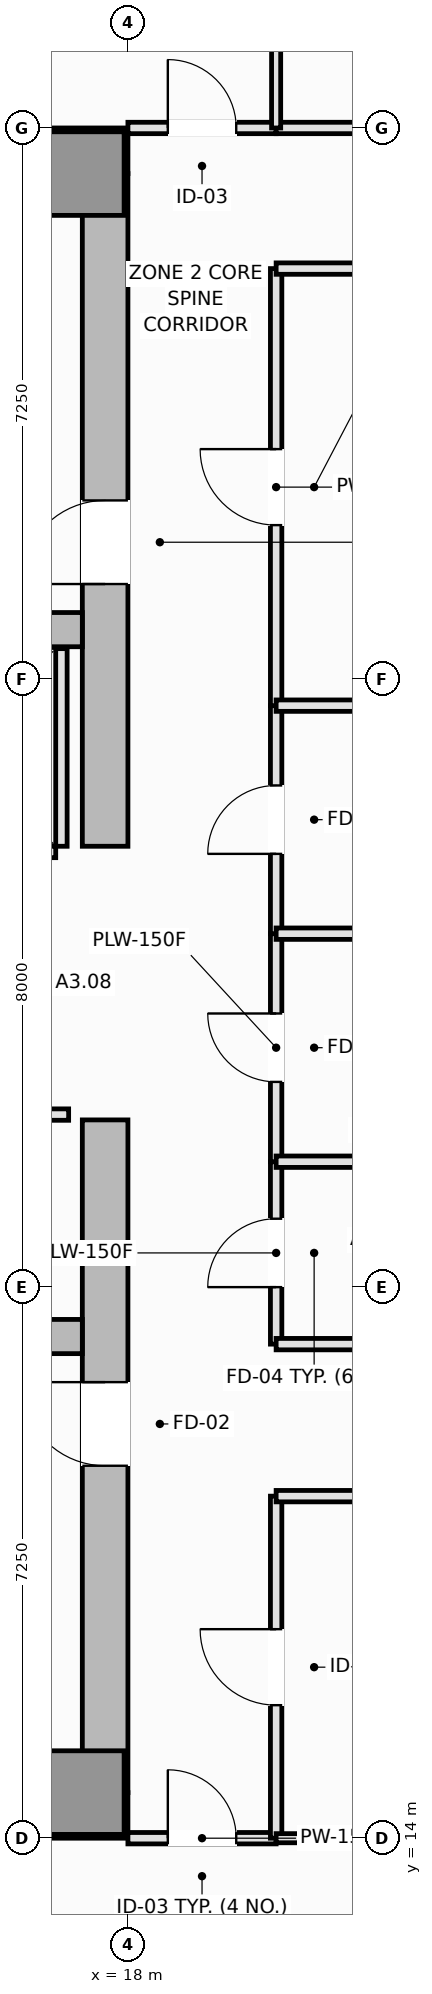
"""IFC4 building model, lengths in metres.
Left out: names, types, materials, properties, quantities, classifications, styles, units other than length and angle.
Written with IfcOpenShell. Run it as: python <this file> out.ifc"""

import sys

from ifc_helpers import new_model, si_unit, direction, frame, frame_2d, origin, origin_2d, place, context, subcontext, project, spatial, rectangle, extrude, element, fill, save


model = new_model("IFC4")
c1 = context("Model", 3, precision=1e-05, world=origin(), true_north=direction((0.0, 1.0)))
c2 = subcontext(c1, "Body", "Model", "MODEL_VIEW")
j1 = project(units=[si_unit("LENGTHUNIT", "METRE"), si_unit("PLANEANGLEUNIT", "RADIAN")], contexts=[c1])
p1 = place(None, origin())
s1 = spatial("IfcSite", under=j1, at=p1, CompositionType="ELEMENT")
p2 = place(p1, origin())
s2 = spatial("IfcBuilding", under=s1, at=p2, CompositionType="ELEMENT")
p3 = place(p2, frame((0.0, 0.0, 137.75)))
s3 = spatial("IfcBuildingStorey", under=s2, at=p3, CompositionType="ELEMENT", Elevation=137.75)
for number, where, z_axis, x_axis in (
    (1, (4.5, 14.3, 0.0), (0.0, 0.0, 1.0), (1.0, 0.0, 0.0)),
    (2, (4.5, 36.2, 0.0), (0.0, 0.0, 1.0), (1.0, 0.0, 0.0)),
):
    element("IfcWall", number, at=place(p3, frame(where, z_axis=z_axis, x_axis=x_axis)), inside=s3, PredefinedType="SHEAR", context=c2, shape_type="SweptSolid", body=[
        extrude(rectangle(XDim=13.5, YDim=0.6, at=frame_2d((6.75, 0.0))), origin(), (0.0, 0.0, 1.0), 3.55),
    ])
p4 = place(p3, frame((17.7, 14.6, 0.0), z_axis=(0.0, 0.0, 1.0), x_axis=(0.0, 1.0, 0.0)))
e3 = element("IfcWall", 3, at=p4, inside=s3, PredefinedType="SHEAR", context=c2, shape_type="SweptSolid", body=[
    extrude(rectangle(XDim=8.85, YDim=0.6, at=frame_2d((4.425, 0.0))), origin(), (0.0, 0.0, 1.0), 3.55),
])
p5 = place(p4, frame((4.3, 0.0, 0.0)))
e4 = element("IfcOpeningElement", 4, at=p5, cuts=e3, PredefinedType="OPENING", context=c2, shape_type="SweptSolid", body=[
    extrude(rectangle(XDim=1.1, YDim=2.15, at=frame_2d((0.55, 1.075))), frame((0.0, 0.31, 0.0), z_axis=(0.0, -1.0, 0.0), x_axis=(1.0, 0.0, 0.0)), (0.0, 0.0, 1.0), 0.62),
])
p6 = place(p3, frame((17.7, 27.05, 0.0), z_axis=(0.0, 0.0, 1.0), x_axis=(0.0, 1.0, 0.0)))
e5 = element("IfcWall", 5, at=p6, inside=s3, PredefinedType="SHEAR", context=c2, shape_type="SweptSolid", body=[
    extrude(rectangle(XDim=8.85, YDim=0.6, at=frame_2d((4.425, 0.0))), origin(), (0.0, 0.0, 1.0), 3.55),
])
p7 = place(p6, frame((3.45, 0.0, 0.0)))
e6 = element("IfcOpeningElement", 6, at=p7, cuts=e5, PredefinedType="OPENING", context=c2, shape_type="SweptSolid", body=[
    extrude(rectangle(XDim=1.1, YDim=2.15, at=frame_2d((0.55, 1.075))), frame((0.0, 0.31, 0.0), z_axis=(0.0, -1.0, 0.0), x_axis=(1.0, 0.0, 0.0)), (0.0, 0.0, 1.0), 0.62),
])
for number, where, z_axis, x_axis in (
    (7, (5.1, 20.6, 0.0), (0.0, 0.0, 1.0), (1.0, 0.0, 0.0)),
    (8, (5.1, 29.9, 0.0), (0.0, 0.0, 1.0), (1.0, 0.0, 0.0)),
):
    element("IfcWall", number, at=place(p3, frame(where, z_axis=z_axis, x_axis=x_axis)), inside=s3, PredefinedType="SHEAR", context=c2, shape_type="SweptSolid", body=[
        extrude(rectangle(XDim=12.3, YDim=0.45, at=frame_2d((6.15, 0.0))), origin(), (0.0, 0.0, 1.0), 3.55),
    ])
for number, where, z_axis, x_axis in (
    (9, (17.4, 14.6, 0.0), (0.0, 0.0, 1.0), (1.0, 0.0, 0.0)),
    (10, (17.4, 35.9, 0.0), (0.0, 0.0, 1.0), (1.0, 0.0, 0.0)),
):
    element("IfcColumn", number, at=place(p3, frame(where, z_axis=z_axis, x_axis=x_axis)), inside=s3, PredefinedType="PILASTER", context=c2, shape_type="SweptSolid", body=[
        extrude(rectangle(XDim=1.1, YDim=1.1, at=origin_2d()), origin(), (0.0, 0.0, 1.0), 3.55),
    ])
p8 = place(p3, frame((14.5, 26.975, 0.0), z_axis=(0.0, 0.0, 1.0), x_axis=(1.0, 0.0, 0.0)))
e11 = element("IfcWall", 11, at=p8, inside=s3, PredefinedType="PARTITIONING", context=c2, shape_type="SweptSolid", body=[
    extrude(rectangle(XDim=2.55, YDim=0.15, at=frame_2d((1.275, 0.0))), origin(), (0.0, 0.0, 1.0), 3.37),
])
p9 = place(p8, frame((0.625, 0.0, 0.0)))
e12 = element("IfcOpeningElement", 12, at=p9, cuts=e11, PredefinedType="OPENING", context=c2, shape_type="SweptSolid", body=[
    extrude(rectangle(XDim=1.3, YDim=2.2, at=frame_2d((0.65, 1.1))), frame((0.0, 0.085, 0.0), z_axis=(0.0, -1.0, 0.0), x_axis=(1.0, 0.0, 0.0)), (0.0, 0.0, 1.0), 0.17),
])
p10 = place(p3, frame((17.125, 27.05, 0.0), z_axis=(0.0, 0.0, 1.0), x_axis=(0.0, 1.0, 0.0)))
e13 = element("IfcWall", 13, at=p10, inside=s3, PredefinedType="PARTITIONING", context=c2, shape_type="SweptSolid", body=[
    extrude(rectangle(XDim=2.6, YDim=0.15, at=frame_2d((1.3, 0.0))), origin(), (0.0, 0.0, 1.0), 3.37),
])
p11 = place(p3, frame((14.33, 23.52, 0.0), z_axis=(0.0, 0.0, 1.0), x_axis=(1.0, 0.0, 0.0)))
e14 = element("IfcWall", 14, at=p11, inside=s3, PredefinedType="PARTITIONING", context=c2, shape_type="SweptSolid", body=[
    extrude(rectangle(XDim=2.89, YDim=0.15, at=frame_2d((1.445, 0.0))), origin(), (0.0, 0.0, 1.0), 3.37),
])
p12 = place(p11, frame((0.28, 0.0, 0.0)))
e15 = element("IfcOpeningElement", 15, at=p12, cuts=e14, PredefinedType="OPENING", context=c2, shape_type="SweptSolid", body=[
    extrude(rectangle(XDim=0.9, YDim=2.1, at=frame_2d((0.45, 1.05))), frame((0.0, 0.085, 0.0), z_axis=(0.0, -1.0, 0.0), x_axis=(1.0, 0.0, 0.0)), (0.0, 0.0, 1.0), 0.17),
])
p13 = place(p11, frame((1.71, 0.0, 0.0)))
e16 = element("IfcOpeningElement", 16, at=p13, cuts=e14, PredefinedType="OPENING", context=c2, shape_type="SweptSolid", body=[
    extrude(rectangle(XDim=0.9, YDim=2.1, at=frame_2d((0.45, 1.05))), frame((0.0, 0.085, 0.0), z_axis=(0.0, -1.0, 0.0), x_axis=(1.0, 0.0, 0.0)), (0.0, 0.0, 1.0), 0.17),
])
p14 = place(p3, frame((19.95, 20.5, 0.0), z_axis=(0.0, 0.0, 1.0), x_axis=(0.0, 1.0, 0.0)))
e17 = element("IfcWall", 17, at=p14, inside=s3, PredefinedType="PLUMBINGWALL", context=c2, shape_type="SweptSolid", body=[
    extrude(rectangle(XDim=2.4, YDim=0.15, at=frame_2d((1.2, 0.0))), origin(), (0.0, 0.0, 1.0), 3.37),
])
p15 = place(p14, frame((0.75, 0.0, 0.0)))
e18 = element("IfcOpeningElement", 18, at=p15, cuts=e17, PredefinedType="OPENING", context=c2, shape_type="SweptSolid", body=[
    extrude(rectangle(XDim=0.9, YDim=2.1, at=frame_2d((0.45, 1.05))), frame((0.0, 0.085, 0.0), z_axis=(0.0, -1.0, 0.0), x_axis=(1.0, 0.0, 0.0)), (0.0, 0.0, 1.0), 0.17),
])
p16 = place(p3, frame((19.95, 22.9, 0.0), z_axis=(0.0, 0.0, 1.0), x_axis=(0.0, 1.0, 0.0)))
e19 = element("IfcWall", 19, at=p16, inside=s3, PredefinedType="PLUMBINGWALL", context=c2, shape_type="SweptSolid", body=[
    extrude(rectangle(XDim=3.0, YDim=0.15, at=frame_2d((1.5, 0.0))), origin(), (0.0, 0.0, 1.0), 3.37),
])
p17 = place(p16, frame((1.05, 0.0, 0.0)))
e20 = element("IfcOpeningElement", 20, at=p17, cuts=e19, PredefinedType="OPENING", context=c2, shape_type="SweptSolid", body=[
    extrude(rectangle(XDim=0.9, YDim=2.1, at=frame_2d((0.45, 1.05))), frame((0.0, 0.085, 0.0), z_axis=(0.0, -1.0, 0.0), x_axis=(1.0, 0.0, 0.0)), (0.0, 0.0, 1.0), 0.17),
])
p18 = place(p3, frame((19.95, 25.9, 0.0), z_axis=(0.0, 0.0, 1.0), x_axis=(0.0, 1.0, 0.0)))
e21 = element("IfcWall", 21, at=p18, inside=s3, PredefinedType="PLUMBINGWALL", context=c2, shape_type="SweptSolid", body=[
    extrude(rectangle(XDim=3.0, YDim=0.15, at=frame_2d((1.5, 0.0))), origin(), (0.0, 0.0, 1.0), 3.37),
])
p19 = place(p18, frame((1.05, 0.0, 0.0)))
e22 = element("IfcOpeningElement", 22, at=p19, cuts=e21, PredefinedType="OPENING", context=c2, shape_type="SweptSolid", body=[
    extrude(rectangle(XDim=0.9, YDim=2.1, at=frame_2d((0.45, 1.05))), frame((0.0, 0.085, 0.0), z_axis=(0.0, -1.0, 0.0), x_axis=(1.0, 0.0, 0.0)), (0.0, 0.0, 1.0), 0.17),
])
p20 = place(p3, frame((19.95, 28.9, 0.0), z_axis=(0.0, 0.0, 1.0), x_axis=(0.0, 1.0, 0.0)))
e23 = element("IfcWall", 23, at=p20, inside=s3, PredefinedType="PARTITIONING", context=c2, shape_type="SweptSolid", body=[
    extrude(rectangle(XDim=5.75, YDim=0.15, at=frame_2d((2.875, 0.0))), origin(), (0.0, 0.0, 1.0), 3.37),
])
p21 = place(p20, frame((2.375, 0.0, 0.0)))
e24 = element("IfcOpeningElement", 24, at=p21, cuts=e23, PredefinedType="OPENING", context=c2, shape_type="SweptSolid", body=[
    extrude(rectangle(XDim=1.0, YDim=2.15, at=frame_2d((0.5, 1.075))), frame((0.0, 0.085, 0.0), z_axis=(0.0, -1.0, 0.0), x_axis=(1.0, 0.0, 0.0)), (0.0, 0.0, 1.0), 0.17),
])
p22 = place(p3, frame((18.0, 14.0, 0.0), z_axis=(0.0, 0.0, 1.0), x_axis=(1.0, 0.0, 0.0)))
e25 = element("IfcWall", 25, at=p22, inside=s3, PredefinedType="PARTITIONING", context=c2, shape_type="SweptSolid", body=[
    extrude(rectangle(XDim=1.95, YDim=0.15, at=frame_2d((0.975, 0.0))), origin(), (0.0, 0.0, 1.0), 3.37),
])
p23 = place(p22, frame((0.525, 0.0, 0.0)))
e26 = element("IfcOpeningElement", 26, at=p23, cuts=e25, PredefinedType="OPENING", context=c2, shape_type="SweptSolid", body=[
    extrude(rectangle(XDim=0.9, YDim=2.1, at=frame_2d((0.45, 1.05))), frame((0.0, 0.085, 0.0), z_axis=(0.0, -1.0, 0.0), x_axis=(1.0, 0.0, 0.0)), (0.0, 0.0, 1.0), 0.17),
])
p24 = place(p3, frame((19.95, 14.0, 0.0), z_axis=(0.0, 0.0, 1.0), x_axis=(0.0, 1.0, 0.0)))
e27 = element("IfcWall", 27, at=p24, inside=s3, PredefinedType="PARTITIONING", context=c2, shape_type="SweptSolid", body=[
    extrude(rectangle(XDim=4.5, YDim=0.15, at=frame_2d((2.25, 0.0))), origin(), (0.0, 0.0, 1.0), 3.37),
])
p25 = place(p24, frame((1.75, 0.0, 0.0)))
e28 = element("IfcOpeningElement", 28, at=p25, cuts=e27, PredefinedType="OPENING", context=c2, shape_type="SweptSolid", body=[
    extrude(rectangle(XDim=1.0, YDim=2.15, at=frame_2d((0.5, 1.075))), frame((0.0, 0.085, 0.0), z_axis=(0.0, -1.0, 0.0), x_axis=(1.0, 0.0, 0.0)), (0.0, 0.0, 1.0), 0.17),
])
p26 = place(p3, frame((18.0, 36.5, 0.0), z_axis=(0.0, 0.0, 1.0), x_axis=(1.0, 0.0, 0.0)))
e29 = element("IfcWall", 29, at=p26, inside=s3, PredefinedType="PARTITIONING", context=c2, shape_type="SweptSolid", body=[
    extrude(rectangle(XDim=1.95, YDim=0.15, at=frame_2d((0.975, 0.0))), origin(), (0.0, 0.0, 1.0), 3.37),
])
p27 = place(p26, frame((0.525, 0.0, 0.0)))
e30 = element("IfcOpeningElement", 30, at=p27, cuts=e29, PredefinedType="OPENING", context=c2, shape_type="SweptSolid", body=[
    extrude(rectangle(XDim=0.9, YDim=2.1, at=frame_2d((0.45, 1.05))), frame((0.0, 0.085, 0.0), z_axis=(0.0, -1.0, 0.0), x_axis=(1.0, 0.0, 0.0)), (0.0, 0.0, 1.0), 0.17),
])
p28 = place(p3, frame((19.95, 20.5, 0.0), z_axis=(0.0, 0.0, 1.0), x_axis=(1.0, 0.0, 0.0)))
e31 = element("IfcWall", 31, at=p28, inside=s3, PredefinedType="PLUMBINGWALL", context=c2, shape_type="SweptSolid", body=[
    extrude(rectangle(XDim=3.05, YDim=0.15, at=frame_2d((1.525, 0.0))), origin(), (0.0, 0.0, 1.0), 3.37),
])
p29 = place(p3, frame((19.95, 18.5, 0.0), z_axis=(0.0, 0.0, 1.0), x_axis=(1.0, 0.0, 0.0)))
e32 = element("IfcWall", 32, at=p29, inside=s3, PredefinedType="PARTITIONING", context=c2, shape_type="SweptSolid", body=[
    extrude(rectangle(XDim=7.55, YDim=0.15, at=frame_2d((3.775, 0.0))), origin(), (0.0, 0.0, 1.0), 2.77),
])
p30 = place(p3, frame((19.95, 34.65, 0.0), z_axis=(0.0, 0.0, 1.0), x_axis=(1.0, 0.0, 0.0)))
e33 = element("IfcWall", 33, at=p30, inside=s3, PredefinedType="PARTITIONING", context=c2, shape_type="SweptSolid", body=[
    extrude(rectangle(XDim=7.55, YDim=0.15, at=frame_2d((3.775, 0.0))), origin(), (0.0, 0.0, 1.0), 3.37),
])
p31 = place(p3, frame((19.95, 36.5, 0.0), z_axis=(0.0, 0.0, 1.0), x_axis=(1.0, 0.0, 0.0)))
e34 = element("IfcWall", 34, at=p31, inside=s3, PredefinedType="PARTITIONING", context=c2, shape_type="SweptSolid", body=[
    extrude(rectangle(XDim=7.55, YDim=0.15, at=frame_2d((3.775, 0.0))), origin(), (0.0, 0.0, 1.0), 3.37),
])
p32 = place(p31, frame((3.275, 0.0, 0.0)))
e35 = element("IfcOpeningElement", 35, at=p32, cuts=e34, PredefinedType="OPENING", context=c2, shape_type="SweptSolid", body=[
    extrude(rectangle(XDim=1.0, YDim=2.15, at=frame_2d((0.5, 1.075))), frame((0.0, 0.085, 0.0), z_axis=(0.0, -1.0, 0.0), x_axis=(1.0, 0.0, 0.0)), (0.0, 0.0, 1.0), 0.17),
])
p33 = place(p3, frame((19.95, 22.9, 0.0), z_axis=(0.0, 0.0, 1.0), x_axis=(1.0, 0.0, 0.0)))
e36 = element("IfcWall", 36, at=p33, inside=s3, PredefinedType="PLUMBINGWALL", context=c2, shape_type="SweptSolid", body=[
    extrude(rectangle(XDim=3.05, YDim=0.15, at=frame_2d((1.525, 0.0))), origin(), (0.0, 0.0, 1.0), 3.37),
])
for number, where, z_axis, x_axis in (
    (37, (19.95, 25.9, 0.0), (0.0, 0.0, 1.0), (1.0, 0.0, 0.0)),
    (38, (19.95, 28.9, 0.0), (0.0, 0.0, 1.0), (1.0, 0.0, 0.0)),
):
    element("IfcWall", number, at=place(p3, frame(where, z_axis=z_axis, x_axis=x_axis)), inside=s3, PredefinedType="PLUMBINGWALL", context=c2, shape_type="SweptSolid", body=[
        extrude(rectangle(XDim=5.45, YDim=0.15, at=frame_2d((2.725, 0.0))), origin(), (0.0, 0.0, 1.0), 3.37),
    ])
p34 = place(p3, frame((19.95, 14.0, 0.0), z_axis=(0.0, 0.0, 1.0), x_axis=(1.0, 0.0, 0.0)))
e39 = element("IfcWall", 39, at=p34, inside=s3, PredefinedType="PARTITIONING", context=c2, shape_type="SweptSolid", body=[
    extrude(rectangle(XDim=7.55, YDim=0.12, at=frame_2d((3.775, 0.0))), origin(), (0.0, 0.0, 1.0), 3.37),
])
p35 = place(p3, frame((19.95, 36.5, 0.0), z_axis=(0.0, 0.0, 1.0), x_axis=(0.0, 1.0, 0.0)))
e40 = element("IfcWall", 40, at=p35, inside=s3, PredefinedType="PARTITIONING", context=c2, shape_type="SweptSolid", body=[
    extrude(rectangle(XDim=9.99, YDim=0.12, at=frame_2d((4.995, 0.0))), origin(), (0.0, 0.0, 1.0), 3.37),
])
p36 = place(p5, origin())
e41 = element("IfcDoor", 41, at=p36, inside=s3, OperationType="SINGLE_SWING_RIGHT", PredefinedType="DOOR", context=c2, shape_type="SweptSolid", body=[
    extrude(rectangle(XDim=1.1, YDim=2.15, at=frame_2d((0.55, 1.075))), frame((0.0, 0.025, 0.0), z_axis=(0.0, -1.0, 0.0), x_axis=(1.0, 0.0, 0.0)), (0.0, 0.0, 1.0), 0.05),
])
fill(e4, e41)
p37 = place(p7, origin())
e42 = element("IfcDoor", 42, at=p37, inside=s3, OperationType="SINGLE_SWING_LEFT", PredefinedType="DOOR", context=c2, shape_type="SweptSolid", body=[
    extrude(rectangle(XDim=1.1, YDim=2.15, at=frame_2d((0.55, 1.075))), frame((0.0, 0.025, 0.0), z_axis=(0.0, -1.0, 0.0), x_axis=(1.0, 0.0, 0.0)), (0.0, 0.0, 1.0), 0.05),
])
fill(e6, e42)
p38 = place(p15, origin())
e43 = element("IfcDoor", 43, at=p38, inside=s3, OperationType="SINGLE_SWING_LEFT", PredefinedType="DOOR", context=c2, shape_type="SweptSolid", body=[
    extrude(rectangle(XDim=0.9, YDim=2.1, at=frame_2d((0.45, 1.05))), frame((0.0, 0.025, 0.0), z_axis=(0.0, -1.0, 0.0), x_axis=(1.0, 0.0, 0.0)), (0.0, 0.0, 1.0), 0.05),
])
fill(e18, e43)
p39 = place(p17, origin())
e44 = element("IfcDoor", 44, at=p39, inside=s3, OperationType="SINGLE_SWING_RIGHT", PredefinedType="DOOR", context=c2, shape_type="SweptSolid", body=[
    extrude(rectangle(XDim=0.9, YDim=2.1, at=frame_2d((0.45, 1.05))), frame((0.0, 0.025, 0.0), z_axis=(0.0, -1.0, 0.0), x_axis=(1.0, 0.0, 0.0)), (0.0, 0.0, 1.0), 0.05),
])
fill(e20, e44)
p40 = place(p19, origin())
e45 = element("IfcDoor", 45, at=p40, inside=s3, OperationType="SINGLE_SWING_LEFT", PredefinedType="DOOR", context=c2, shape_type="SweptSolid", body=[
    extrude(rectangle(XDim=0.9, YDim=2.1, at=frame_2d((0.45, 1.05))), frame((0.0, 0.025, 0.0), z_axis=(0.0, -1.0, 0.0), x_axis=(1.0, 0.0, 0.0)), (0.0, 0.0, 1.0), 0.05),
])
fill(e22, e45)
p41 = place(p21, origin())
e46 = element("IfcDoor", 46, at=p41, inside=s3, OperationType="SINGLE_SWING_RIGHT", PredefinedType="DOOR", context=c2, shape_type="SweptSolid", body=[
    extrude(rectangle(XDim=1.0, YDim=2.15, at=frame_2d((0.5, 1.075))), frame((0.0, 0.025, 0.0), z_axis=(0.0, -1.0, 0.0), x_axis=(1.0, 0.0, 0.0)), (0.0, 0.0, 1.0), 0.05),
])
fill(e24, e46)
p42 = place(p23, origin())
e47 = element("IfcDoor", 47, at=p42, inside=s3, OperationType="SINGLE_SWING_LEFT", PredefinedType="DOOR", context=c2, shape_type="SweptSolid", body=[
    extrude(rectangle(XDim=0.9, YDim=2.1, at=frame_2d((0.45, 1.05))), frame((0.0, 0.025, 0.0), z_axis=(0.0, -1.0, 0.0), x_axis=(1.0, 0.0, 0.0)), (0.0, 0.0, 1.0), 0.05),
])
fill(e26, e47)
p43 = place(p25, origin())
e48 = element("IfcDoor", 48, at=p43, inside=s3, OperationType="SINGLE_SWING_RIGHT", PredefinedType="DOOR", context=c2, shape_type="SweptSolid", body=[
    extrude(rectangle(XDim=1.0, YDim=2.15, at=frame_2d((0.5, 1.075))), frame((0.0, 0.025, 0.0), z_axis=(0.0, -1.0, 0.0), x_axis=(1.0, 0.0, 0.0)), (0.0, 0.0, 1.0), 0.05),
])
fill(e28, e48)
p44 = place(p27, origin())
e49 = element("IfcDoor", 49, at=p44, inside=s3, OperationType="SINGLE_SWING_LEFT", PredefinedType="DOOR", context=c2, shape_type="SweptSolid", body=[
    extrude(rectangle(XDim=0.9, YDim=2.1, at=frame_2d((0.45, 1.05))), frame((0.0, 0.025, 0.0), z_axis=(0.0, -1.0, 0.0), x_axis=(1.0, 0.0, 0.0)), (0.0, 0.0, 1.0), 0.05),
])
fill(e30, e49)
save(model, sys.argv[1])
